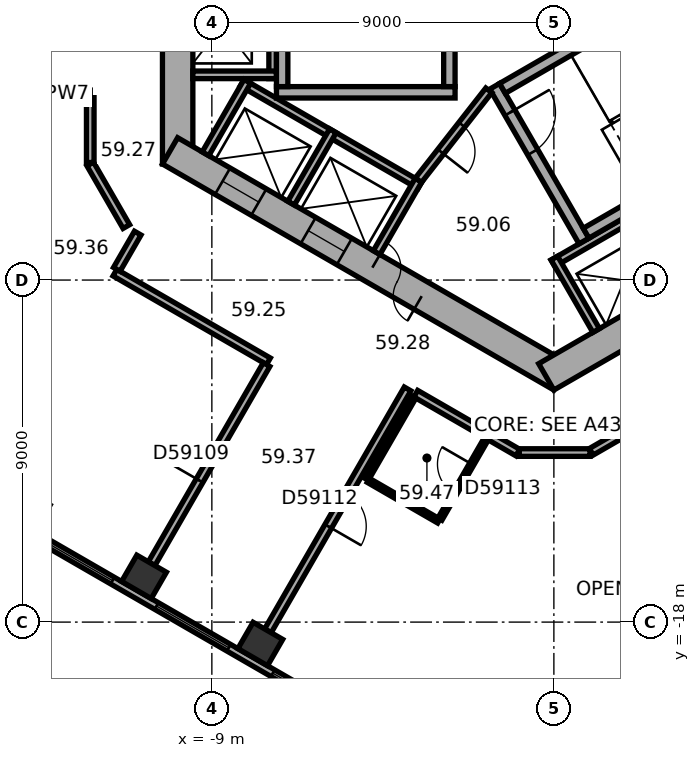
"""IFC4 building model, lengths in metres.
Left out: names, types, materials, properties, quantities, classifications, styles, units other than length and angle.
Written with IfcOpenShell. Run it as: python <this file> out.ifc"""

import sys

from ifc_helpers import new_model, si_unit, direction, frame, frame_2d, origin, origin_2d, place, context, subcontext, project, spatial, rectangle, extrude, element, fill, save


model = new_model("IFC4")
c1 = context("Model", 3, precision=1e-05, world=origin(), true_north=direction((0.0, 1.0)))
c2 = subcontext(c1, "Body", "Model", "MODEL_VIEW")
j1 = project(units=[si_unit("LENGTHUNIT", "METRE"), si_unit("PLANEANGLEUNIT", "RADIAN")], contexts=[c1])
p1 = place(None, origin())
s1 = spatial("IfcSite", under=j1, at=p1, CompositionType="ELEMENT")
p2 = place(p1, origin())
s2 = spatial("IfcBuilding", under=s1, at=p2, CompositionType="ELEMENT")
p3 = place(p2, frame((0.0, 0.0, 240.2)))
s3 = spatial("IfcBuildingStorey", under=s2, at=p3, CompositionType="ELEMENT", Elevation=240.2)
for number, where, z_axis, x_axis in (
    (1, (-10.785, -16.809, 0.0), (0.0, 0.0, 1.0), (0.866, -0.5, 0.0)),
    (2, (-7.725, -18.576, 0.0), (0.0, 0.0, 1.0), (0.866, -0.5, 0.0)),
):
    element("IfcColumn", number, at=place(p3, frame(where, z_axis=z_axis, x_axis=x_axis)), inside=s3, PredefinedType="COLUMN", context=c2, shape_type="SweptSolid", body=[
        extrude(rectangle(XDim=0.9, YDim=0.8, at=origin_2d()), origin(), (0.0, 0.0, 1.0), 3.7),
    ])
p4 = place(p3, frame((-9.9, 5.947, 0.0), z_axis=(0.0, 0.0, 1.0), x_axis=(0.0, -1.0, 0.0)))
e3 = element("IfcWall", 3, at=p4, inside=s3, PredefinedType="SHEAR", context=c2, shape_type="SweptSolid", body=[
    extrude(rectangle(XDim=11.894, YDim=0.8, at=frame_2d((5.947, 0.0))), origin(), (0.0, 0.0, 1.0), 3.7),
])
p5 = place(p4, frame((5.097, 0.0, 0.0)))
e4 = element("IfcOpeningElement", 4, at=p5, cuts=e3, PredefinedType="OPENING", context=c2, shape_type="SweptSolid", body=[
    extrude(rectangle(XDim=1.1, YDim=2.1, at=frame_2d((0.55, 1.05))), frame((0.0, 0.41, 0.0), z_axis=(0.0, -1.0, 0.0), x_axis=(1.0, 0.0, 0.0)), (0.0, 0.0, 1.0), 0.82),
])
p6 = place(p4, frame((7.697, 0.0, 0.0)))
e5 = element("IfcOpeningElement", 5, at=p6, cuts=e3, PredefinedType="OPENING", context=c2, shape_type="SweptSolid", body=[
    extrude(rectangle(XDim=1.1, YDim=2.1, at=frame_2d((0.55, 1.05))), frame((0.0, 0.41, 0.0), z_axis=(0.0, -1.0, 0.0), x_axis=(1.0, 0.0, 0.0)), (0.0, 0.0, 1.0), 0.82),
])
p7 = place(p3, frame((-10.1, -5.6, 0.0), z_axis=(0.0, 0.0, 1.0), x_axis=(0.866023897231, -0.500002609418, 0.0)))
e6 = element("IfcWall", 6, at=p7, inside=s3, PredefinedType="SHEAR", context=c2, shape_type="SweptSolid", body=[
    extrude(rectangle(XDim=11.894, YDim=0.8, at=frame_2d((5.947, 0.0))), origin(), (0.0, 0.0, 1.0), 3.7),
])
p8 = place(p7, frame((6.147, 0.0, 0.0)))
e7 = element("IfcOpeningElement", 7, at=p8, cuts=e6, PredefinedType="OPENING", context=c2, shape_type="SweptSolid", body=[
    extrude(rectangle(XDim=1.5, YDim=2.1, at=frame_2d((0.75, 1.05))), frame((0.0, 0.41, 0.0), z_axis=(0.0, -1.0, 0.0), x_axis=(1.0, 0.0, 0.0)), (0.0, 0.0, 1.0), 0.82),
])
p9 = place(p7, frame((1.597, 0.0, 0.0)))
e8 = element("IfcOpeningElement", 8, at=p9, cuts=e6, PredefinedType="OPENING", context=c2, shape_type="SweptSolid", body=[
    extrude(rectangle(XDim=1.1, YDim=2.1, at=frame_2d((0.55, 1.05))), frame((0.0, 0.41, 0.0), z_axis=(0.0, -1.0, 0.0), x_axis=(1.0, 0.0, 0.0)), (0.0, 0.0, 1.0), 0.82),
])
p10 = place(p7, frame((4.197, 0.0, 0.0)))
e9 = element("IfcOpeningElement", 9, at=p10, cuts=e6, PredefinedType="OPENING", context=c2, shape_type="SweptSolid", body=[
    extrude(rectangle(XDim=1.1, YDim=2.1, at=frame_2d((0.55, 1.05))), frame((0.0, 0.41, 0.0), z_axis=(0.0, -1.0, 0.0), x_axis=(1.0, 0.0, 0.0)), (0.0, 0.0, 1.0), 0.82),
])
p11 = place(p3, frame((-0.2, -11.547, 0.0), z_axis=(0.0, 0.0, 1.0), x_axis=(0.866023897231, 0.500002609418, 0.0)))
e10 = element("IfcWall", 10, at=p11, inside=s3, PredefinedType="SHEAR", context=c2, shape_type="SweptSolid", body=[
    extrude(rectangle(XDim=11.894, YDim=0.8, at=frame_2d((5.947, 0.0))), origin(), (0.0, 0.0, 1.0), 3.7),
])
p12 = place(p11, frame((2.497, 0.0, 0.0)))
e11 = element("IfcOpeningElement", 11, at=p12, cuts=e10, PredefinedType="OPENING", context=c2, shape_type="SweptSolid", body=[
    extrude(rectangle(XDim=1.1, YDim=2.1, at=frame_2d((0.55, 1.05))), frame((0.0, 0.41, 0.0), z_axis=(0.0, -1.0, 0.0), x_axis=(1.0, 0.0, 0.0)), (0.0, 0.0, 1.0), 0.82),
])
p13 = place(p11, frame((5.097, 0.0, 0.0)))
e12 = element("IfcOpeningElement", 12, at=p13, cuts=e10, PredefinedType="OPENING", context=c2, shape_type="SweptSolid", body=[
    extrude(rectangle(XDim=1.1, YDim=2.1, at=frame_2d((0.55, 1.05))), frame((0.0, 0.41, 0.0), z_axis=(0.0, -1.0, 0.0), x_axis=(1.0, 0.0, 0.0)), (0.0, 0.0, 1.0), 0.82),
])
p14 = place(p11, frame((7.697, 0.0, 0.0)))
e13 = element("IfcOpeningElement", 13, at=p14, cuts=e10, PredefinedType="OPENING", context=c2, shape_type="SweptSolid", body=[
    extrude(rectangle(XDim=1.1, YDim=2.1, at=frame_2d((0.55, 1.05))), frame((0.0, 0.41, 0.0), z_axis=(0.0, -1.0, 0.0), x_axis=(1.0, 0.0, 0.0)), (0.0, 0.0, 1.0), 0.82),
])
p15 = place(p3, frame((-17.664, -13.415, 0.0), z_axis=(0.0, 0.0, 1.0), x_axis=(0.866026555358, -0.49999800541, 0.0)))
e14 = element("IfcWall", 14, at=p15, inside=s3, PredefinedType="STANDARD", context=c2, shape_type="SweptSolid", body=[
    extrude(rectangle(XDim=18.841, YDim=0.2, at=frame_2d((9.421, 0.0))), origin(), (0.0, 0.0, 1.0), 3.7),
])
p16 = place(p15, frame((1.254, 0.0, 0.9)))
e15 = element("IfcOpeningElement", 15, at=p16, cuts=e14, PredefinedType="OPENING", context=c2, shape_type="SweptSolid", body=[
    extrude(rectangle(XDim=2.2, YDim=2.0, at=frame_2d((1.1, 1.0))), frame((0.0, 0.11, 0.0), z_axis=(0.0, -1.0, 0.0), x_axis=(1.0, 0.0, 0.0)), (0.0, 0.0, 1.0), 0.22),
])
p17 = place(p15, frame((4.788, 0.0, 0.9)))
e16 = element("IfcOpeningElement", 16, at=p17, cuts=e14, PredefinedType="OPENING", context=c2, shape_type="SweptSolid", body=[
    extrude(rectangle(XDim=2.2, YDim=2.0, at=frame_2d((1.1, 1.0))), frame((0.0, 0.11, 0.0), z_axis=(0.0, -1.0, 0.0), x_axis=(1.0, 0.0, 0.0)), (0.0, 0.0, 1.0), 0.22),
])
p18 = place(p15, frame((8.322, 0.0, 0.9)))
e17 = element("IfcOpeningElement", 17, at=p18, cuts=e14, PredefinedType="OPENING", context=c2, shape_type="SweptSolid", body=[
    extrude(rectangle(XDim=2.2, YDim=2.0, at=frame_2d((1.1, 1.0))), frame((0.0, 0.11, 0.0), z_axis=(0.0, -1.0, 0.0), x_axis=(1.0, 0.0, 0.0)), (0.0, 0.0, 1.0), 0.22),
])
p19 = place(p15, frame((11.855, 0.0, 0.9)))
e18 = element("IfcOpeningElement", 18, at=p19, cuts=e14, PredefinedType="OPENING", context=c2, shape_type="SweptSolid", body=[
    extrude(rectangle(XDim=2.2, YDim=2.0, at=frame_2d((1.1, 1.0))), frame((0.0, 0.11, 0.0), z_axis=(0.0, -1.0, 0.0), x_axis=(1.0, 0.0, 0.0)), (0.0, 0.0, 1.0), 0.22),
])
p20 = place(p15, frame((15.389, 0.0, 0.9)))
e19 = element("IfcOpeningElement", 19, at=p20, cuts=e14, PredefinedType="OPENING", context=c2, shape_type="SweptSolid", body=[
    extrude(rectangle(XDim=2.2, YDim=2.0, at=frame_2d((1.1, 1.0))), frame((0.0, 0.11, 0.0), z_axis=(0.0, -1.0, 0.0), x_axis=(1.0, 0.0, 0.0)), (0.0, 0.0, 1.0), 0.22),
])
p21 = place(p3, frame((-7.4, 4.3, 0.0), z_axis=(0.0, 0.0, 1.0), x_axis=(0.0, -1.0, 0.0)))
e20 = element("IfcWall", 20, at=p21, inside=s3, PredefinedType="PARTITIONING", context=c2, shape_type="SweptSolid", body=[
    extrude(rectangle(XDim=8.0, YDim=0.2, at=frame_2d((4.0, 0.0))), origin(), (0.0, 0.0, 1.0), 3.42),
])
p22 = place(p3, frame((-7.3, -3.6, 0.0), z_axis=(0.0, 0.0, 1.0), x_axis=(-1.0, 0.0, 0.0)))
e21 = element("IfcWall", 21, at=p22, inside=s3, PredefinedType="PARTITIONING", context=c2, shape_type="SweptSolid", body=[
    extrude(rectangle(XDim=2.2, YDim=0.2, at=frame_2d((1.1, 0.0))), origin(), (0.0, 0.0, 1.0), 3.42),
])
p23 = place(p3, frame((-8.203, -3.809, 0.0), z_axis=(0.0, 0.0, 1.0), x_axis=(0.866028230842, -0.499995103361, 0.0)))
e22 = element("IfcWall", 22, at=p23, inside=s3, PredefinedType="PARTITIONING", context=c2, shape_type="SweptSolid", body=[
    extrude(rectangle(XDim=5.4, YDim=0.2, at=frame_2d((2.7, 0.0))), origin(), (0.0, 0.0, 1.0), 3.42),
])
for number, where, z_axis, x_axis in (
    (23, (-8.067, -3.772, 0.0), (0.0, 0.0, 1.0), (-0.5, -0.866, 0.0)),
    (24, (-5.815, -5.072, 0.0), (0.0, 0.0, 1.0), (-0.5, -0.866, 0.0)),
):
    element("IfcWall", number, at=place(p3, frame(where, z_axis=z_axis, x_axis=x_axis)), inside=s3, PredefinedType="PARTITIONING", context=c2, shape_type="SweptSolid", body=[
        extrude(rectangle(XDim=2.2, YDim=0.2, at=frame_2d((1.1, 0.0))), origin(), (0.0, 0.0, 1.0), 3.42),
    ])
p24 = place(p3, frame((-3.563, -6.372, 0.0), z_axis=(0.0, 0.0, 1.0), x_axis=(-0.499994660107, -0.866028486751, 0.0)))
e25 = element("IfcWall", 25, at=p24, inside=s3, PredefinedType="PARTITIONING", context=c2, shape_type="SweptSolid", body=[
    extrude(rectangle(XDim=2.2, YDim=0.2, at=frame_2d((1.1, 0.0))), origin(), (0.0, 0.0, 1.0), 3.42),
])
p25 = place(p3, frame((-0.024, -8.559, 0.0), z_axis=(0.0, 0.0, 1.0), x_axis=(0.866026010844, 0.49999894854, 0.0)))
e26 = element("IfcWall", 26, at=p25, inside=s3, PredefinedType="PARTITIONING", context=c2, shape_type="SweptSolid", body=[
    extrude(rectangle(XDim=8.0, YDim=0.2, at=frame_2d((4.0, 0.0))), origin(), (0.0, 0.0, 1.0), 3.42),
])
p26 = place(p3, frame((0.013, -8.422, 0.0), z_axis=(0.0, 0.0, 1.0), x_axis=(0.500077893725, -0.86598042715, 0.0)))
e27 = element("IfcWall", 27, at=p26, inside=s3, PredefinedType="PARTITIONING", context=c2, shape_type="SweptSolid", body=[
    extrude(rectangle(XDim=2.2, YDim=0.2, at=frame_2d((1.1, 0.0))), origin(), (0.0, 0.0, 1.0), 3.42),
])
p27 = place(p3, frame((-2.6, -4.06, 0.0), z_axis=(0.0, 0.0, 1.0), x_axis=(-1.0, 0.0, 0.0)))
e28 = element("IfcWall", 28, at=p27, inside=s3, PredefinedType="SHEAR", context=c2, shape_type="SweptSolid", body=[
    extrude(rectangle(XDim=4.7, YDim=0.3, at=frame_2d((2.35, 0.0))), origin(), (0.0, 0.0, 1.0), 3.42),
])
for number, where, z_axis, x_axis in (
    (29, (-2.75, 3.15, 0.0), (0.0, 0.0, 1.0), (0.0, -1.0, 0.0)),
    (30, (-7.15, 3.15, 0.0), (0.0, 0.0, 1.0), (0.0, -1.0, 0.0)),
):
    element("IfcWall", number, at=place(p3, frame(where, z_axis=z_axis, x_axis=x_axis)), inside=s3, PredefinedType="SHEAR", context=c2, shape_type="SweptSolid", body=[
        extrude(rectangle(XDim=7.06, YDim=0.3, at=frame_2d((3.53, 0.0))), origin(), (0.0, 0.0, 1.0), 3.42),
    ])
p28 = place(p3, frame((-1.558, -3.902, 0.0), z_axis=(0.0, 0.0, 1.0), x_axis=(0.499977259774, -0.866038532462, 0.0)))
e31 = element("IfcWall", 31, at=p28, inside=s3, PredefinedType="SHEAR", context=c2, shape_type="SweptSolid", body=[
    extrude(rectangle(XDim=4.7, YDim=0.3, at=frame_2d((2.35, 0.0))), origin(), (0.0, 0.0, 1.0), 3.42),
])
p29 = place(p28, frame((0.8, 0.0, 0.0)))
e32 = element("IfcOpeningElement", 32, at=p29, cuts=e31, PredefinedType="OPENING", context=c2, shape_type="SweptSolid", body=[
    extrude(rectangle(XDim=1.2, YDim=2.1, at=frame_2d((0.6, 1.05))), frame((0.0, 0.16, 0.0), z_axis=(0.0, -1.0, 0.0), x_axis=(1.0, 0.0, 0.0)), (0.0, 0.0, 1.0), 0.32),
])
for number, where, z_axis, x_axis in (
    (33, (-1.353, -3.957, 0.0), (0.0, 0.0, 1.0), (0.866, 0.5, 0.0)),
    (34, (0.847, -7.767, 0.0), (0.0, 0.0, 1.0), (0.866, 0.5, 0.0)),
):
    element("IfcWall", number, at=place(p3, frame(where, z_axis=z_axis, x_axis=x_axis)), inside=s3, PredefinedType="SHEAR", context=c2, shape_type="SweptSolid", body=[
        extrude(rectangle(XDim=7.06, YDim=0.3, at=frame_2d((3.53, 0.0))), origin(), (0.0, 0.0, 1.0), 3.42),
    ])
p30 = place(p3, frame((-1.712, -4.008, 0.0), z_axis=(0.0, 0.0, 1.0), x_axis=(-0.616549420702, -0.787316208287, 0.0)))
e35 = element("IfcWall", 35, at=p30, inside=s3, PredefinedType="PARTITIONING", context=c2, shape_type="SweptSolid", body=[
    extrude(rectangle(XDim=3.002, YDim=0.2, at=frame_2d((1.501, 0.0))), origin(), (0.0, 0.0, 1.0), 3.42),
])
p31 = place(p30, frame((1.15, 0.0, 0.0)))
e36 = element("IfcOpeningElement", 36, at=p31, cuts=e35, PredefinedType="OPENING", context=c2, shape_type="SweptSolid", body=[
    extrude(rectangle(XDim=0.9, YDim=2.1, at=frame_2d((0.45, 1.05))), frame((0.0, 0.11, 0.0), z_axis=(0.0, -1.0, 0.0), x_axis=(1.0, 0.0, 0.0)), (0.0, 0.0, 1.0), 0.22),
])
p32 = place(p3, frame((-13.401, -4.101, 0.0), z_axis=(0.0, 0.0, 1.0), x_axis=(1.0, 0.0, 0.0)))
e37 = element("IfcWall", 37, at=p32, inside=s3, PredefinedType="PARTITIONING", context=c2, shape_type="SweptSolid", body=[
    extrude(rectangle(XDim=1.201, YDim=0.2, at=frame_2d((0.601, 0.0))), origin(), (0.0, 0.0, 1.0), 3.42),
])
p33 = place(p3, frame((-12.2, -5.947, 0.0), z_axis=(0.0, 0.0, 1.0), x_axis=(0.500022797313, -0.86601224135, 0.0)))
e38 = element("IfcWall", 38, at=p33, inside=s3, PredefinedType="PARTITIONING", context=c2, shape_type="SweptSolid", body=[
    extrude(rectangle(XDim=1.9, YDim=0.2, at=frame_2d((0.95, 0.0))), origin(), (0.0, 0.0, 1.0), 3.42),
])
p34 = place(p3, frame((-12.2, -4.201, 0.0), z_axis=(0.0, 0.0, 1.0), x_axis=(0.0, -1.0, 0.0)))
e39 = element("IfcWall", 39, at=p34, inside=s3, PredefinedType="PARTITIONING", context=c2, shape_type="SweptSolid", body=[
    extrude(rectangle(XDim=1.706, YDim=0.2, at=frame_2d((0.853, 0.0))), origin(), (0.0, 0.0, 1.0), 3.42),
])
p35 = place(p3, frame((-11.551, -8.805, 0.0), z_axis=(0.0, 0.0, 1.0), x_axis=(0.866038310922, -0.499977643516, 0.0)))
e40 = element("IfcWall", 40, at=p35, inside=s3, PredefinedType="PARTITIONING", context=c2, shape_type="SweptSolid", body=[
    extrude(rectangle(XDim=4.665, YDim=0.2, at=frame_2d((2.333, 0.0))), origin(), (0.0, 0.0, 1.0), 3.42),
])
p36 = place(p3, frame((-10.951, -7.765, 0.0), z_axis=(0.0, 0.0, 1.0), x_axis=(-0.499978356969, -0.866037899034, 0.0)))
e41 = element("IfcWall", 41, at=p36, inside=s3, PredefinedType="PARTITIONING", context=c2, shape_type="SweptSolid", body=[
    extrude(rectangle(XDim=1.101, YDim=0.2, at=frame_2d((0.551, 0.0))), origin(), (0.0, 0.0, 1.0), 3.42),
])
p37 = place(p3, frame((-10.585, -16.463, 0.0), z_axis=(0.0, 0.0, 1.0), x_axis=(0.499993802756, 0.866028981735, 0.0)))
e42 = element("IfcWall", 42, at=p37, inside=s3, PredefinedType="PARTITIONING", context=c2, shape_type="SweptSolid", body=[
    extrude(rectangle(XDim=6.049, YDim=0.2, at=frame_2d((3.024, 0.0))), origin(), (0.0, 0.0, 1.0), 2.87),
])
p38 = place(p37, frame((2.524, 0.0, 0.0)))
e43 = element("IfcOpeningElement", 43, at=p38, cuts=e42, PredefinedType="OPENING", context=c2, shape_type="SweptSolid", body=[
    extrude(rectangle(XDim=1.0, YDim=2.1, at=frame_2d((0.5, 1.05))), frame((0.0, 0.11, 0.0), z_axis=(0.0, -1.0, 0.0), x_axis=(1.0, 0.0, 0.0)), (0.0, 0.0, 1.0), 0.22),
])
p39 = place(p3, frame((-7.525, -18.23, 0.0), z_axis=(0.0, 0.0, 1.0), x_axis=(0.499983153418, 0.866035129944, 0.0)))
e44 = element("IfcWall", 44, at=p39, inside=s3, PredefinedType="PARTITIONING", context=c2, shape_type="SweptSolid", body=[
    extrude(rectangle(XDim=7.35, YDim=0.2, at=frame_2d((3.675, 0.0))), origin(), (0.0, 0.0, 1.0), 3.42),
])
p40 = place(p39, frame((3.175, 0.0, 0.0)))
e45 = element("IfcOpeningElement", 45, at=p40, cuts=e44, PredefinedType="OPENING", context=c2, shape_type="SweptSolid", body=[
    extrude(rectangle(XDim=1.0, YDim=2.1, at=frame_2d((0.5, 1.05))), frame((0.0, 0.11, 0.0), z_axis=(0.0, -1.0, 0.0), x_axis=(1.0, 0.0, 0.0)), (0.0, 0.0, 1.0), 0.22),
])
p41 = place(p3, frame((-4.934, -14.241, 0.0), z_axis=(0.0, 0.0, 1.0), x_axis=(0.500004234368, 0.866022959057, 0.0)))
e46 = element("IfcWall", 46, at=p41, inside=s3, PredefinedType="PARTITIONING", context=c2, shape_type="SweptSolid", body=[
    extrude(rectangle(XDim=2.5, YDim=0.12, at=frame_2d((1.25, 0.0))), origin(), (0.0, 0.0, 1.0), 3.42),
])
p42 = place(p3, frame((-3.634, -11.99, 0.0), z_axis=(0.0, 0.0, 1.0), x_axis=(0.866033392248, -0.499986163319, 0.0)))
e47 = element("IfcWall", 47, at=p42, inside=s3, PredefinedType="PARTITIONING", context=c2, shape_type="SweptSolid", body=[
    extrude(rectangle(XDim=3.099, YDim=0.2, at=frame_2d((1.549, 0.0))), origin(), (0.0, 0.0, 1.0), 3.42),
])
p43 = place(p3, frame((-3.028, -15.341, 0.0), z_axis=(0.0, 0.0, 1.0), x_axis=(-0.86600889856, 0.500028586798, 0.0)))
e48 = element("IfcWall", 48, at=p43, inside=s3, PredefinedType="PARTITIONING", context=c2, shape_type="SweptSolid", body=[
    extrude(rectangle(XDim=2.14, YDim=0.12, at=frame_2d((1.07, 0.0))), origin(), (0.0, 0.0, 1.0), 3.42),
])
p44 = place(p3, frame((-1.778, -13.176, 0.0), z_axis=(0.0, 0.0, 1.0), x_axis=(-0.500002508028, -0.866023955769, 0.0)))
e49 = element("IfcWall", 49, at=p44, inside=s3, PredefinedType="PARTITIONING", context=c2, shape_type="SweptSolid", body=[
    extrude(rectangle(XDim=2.44, YDim=0.12, at=frame_2d((1.22, 0.0))), origin(), (0.0, 0.0, 1.0), 3.42),
])
p45 = place(p44, frame((0.77, 0.0, 0.0)))
e50 = element("IfcOpeningElement", 50, at=p45, cuts=e49, PredefinedType="OPENING", context=c2, shape_type="SweptSolid", body=[
    extrude(rectangle(XDim=0.9, YDim=2.1, at=frame_2d((0.45, 1.05))), frame((0.0, 0.07, 0.0), z_axis=(0.0, -1.0, 0.0), x_axis=(1.0, 0.0, 0.0)), (0.0, 0.0, 1.0), 0.14),
])
p46 = place(p3, frame((-0.91, -13.539, 0.0), z_axis=(0.0, 0.0, 1.0), x_axis=(1.0, 0.0, 0.0)))
e51 = element("IfcWall", 51, at=p46, inside=s3, PredefinedType="PARTITIONING", context=c2, shape_type="SweptSolid", body=[
    extrude(rectangle(XDim=1.86, YDim=0.2, at=frame_2d((0.93, 0.0))), origin(), (0.0, 0.0, 1.0), 3.42),
])
p47 = place(p3, frame((0.985, -13.519, 0.0), z_axis=(0.0, 0.0, 1.0), x_axis=(0.866054082991, 0.499950322867, 0.0)))
e52 = element("IfcWall", 52, at=p47, inside=s3, PredefinedType="PARTITIONING", context=c2, shape_type="SweptSolid", body=[
    extrude(rectangle(XDim=1.206, YDim=0.2, at=frame_2d((0.603, 0.0))), origin(), (0.0, 0.0, 1.0), 3.42),
])
p48 = place(p17, origin())
e53 = element("IfcWindow", 53, at=p48, inside=s3, PartitioningType="SINGLE_PANEL", PredefinedType="WINDOW", context=c2, shape_type="SweptSolid", body=[
    extrude(rectangle(XDim=2.2, YDim=2.0, at=frame_2d((1.1, 1.0))), frame((0.0, 0.03, 0.0), z_axis=(0.0, -1.0, 0.0), x_axis=(1.0, 0.0, 0.0)), (0.0, 0.0, 1.0), 0.06),
])
fill(e16, e53)
p49 = place(p18, origin())
e54 = element("IfcWindow", 54, at=p49, inside=s3, PartitioningType="SINGLE_PANEL", PredefinedType="WINDOW", context=c2, shape_type="SweptSolid", body=[
    extrude(rectangle(XDim=2.2, YDim=2.0, at=frame_2d((1.1, 1.0))), frame((0.0, 0.03, 0.0), z_axis=(0.0, -1.0, 0.0), x_axis=(1.0, 0.0, 0.0)), (0.0, 0.0, 1.0), 0.06),
])
fill(e17, e54)
p50 = place(p19, origin())
e55 = element("IfcWindow", 55, at=p50, inside=s3, PartitioningType="SINGLE_PANEL", PredefinedType="WINDOW", context=c2, shape_type="SweptSolid", body=[
    extrude(rectangle(XDim=2.2, YDim=2.0, at=frame_2d((1.1, 1.0))), frame((0.0, 0.03, 0.0), z_axis=(0.0, -1.0, 0.0), x_axis=(1.0, 0.0, 0.0)), (0.0, 0.0, 1.0), 0.06),
])
fill(e18, e55)
p51 = place(p8, origin())
e56 = element("IfcDoor", 56, at=p51, inside=s3, OperationType="DOUBLE_DOOR_SINGLE_SWING", PredefinedType="DOOR", context=c2, shape_type="SweptSolid", body=[
    extrude(rectangle(XDim=1.5, YDim=2.1, at=frame_2d((0.75, 1.05))), frame((0.0, 0.025, 0.0), z_axis=(0.0, -1.0, 0.0), x_axis=(1.0, 0.0, 0.0)), (0.0, 0.0, 1.0), 0.05),
])
fill(e7, e56)
p52 = place(p29, origin())
e57 = element("IfcDoor", 57, at=p52, inside=s3, OperationType="SINGLE_SWING_RIGHT", PredefinedType="DOOR", context=c2, shape_type="SweptSolid", body=[
    extrude(rectangle(XDim=1.2, YDim=2.1, at=frame_2d((0.6, 1.05))), frame((0.0, 0.025, 0.0), z_axis=(0.0, -1.0, 0.0), x_axis=(1.0, 0.0, 0.0)), (0.0, 0.0, 1.0), 0.05),
])
fill(e32, e57)
p53 = place(p31, origin())
e58 = element("IfcDoor", 58, at=p53, inside=s3, OperationType="SINGLE_SWING_LEFT", PredefinedType="DOOR", context=c2, shape_type="SweptSolid", body=[
    extrude(rectangle(XDim=0.9, YDim=2.1, at=frame_2d((0.45, 1.05))), frame((0.0, 0.025, 0.0), z_axis=(0.0, -1.0, 0.0), x_axis=(1.0, 0.0, 0.0)), (0.0, 0.0, 1.0), 0.05),
])
fill(e36, e58)
p54 = place(p9, origin())
e59 = element("IfcDoor", 59, at=p54, inside=s3, OperationType="DOUBLE_DOOR_SLIDING", PredefinedType="DOOR", context=c2, shape_type="SweptSolid", body=[
    extrude(rectangle(XDim=1.1, YDim=2.1, at=frame_2d((0.55, 1.05))), frame((0.0, 0.025, 0.0), z_axis=(0.0, -1.0, 0.0), x_axis=(1.0, 0.0, 0.0)), (0.0, 0.0, 1.0), 0.05),
])
fill(e8, e59)
p55 = place(p10, origin())
e60 = element("IfcDoor", 60, at=p55, inside=s3, OperationType="DOUBLE_DOOR_SLIDING", PredefinedType="DOOR", context=c2, shape_type="SweptSolid", body=[
    extrude(rectangle(XDim=1.1, YDim=2.1, at=frame_2d((0.55, 1.05))), frame((0.0, 0.025, 0.0), z_axis=(0.0, -1.0, 0.0), x_axis=(1.0, 0.0, 0.0)), (0.0, 0.0, 1.0), 0.05),
])
fill(e9, e60)
p56 = place(p38, origin())
e61 = element("IfcDoor", 61, at=p56, inside=s3, OperationType="SINGLE_SWING_LEFT", PredefinedType="DOOR", context=c2, shape_type="SweptSolid", body=[
    extrude(rectangle(XDim=1.0, YDim=2.1, at=frame_2d((0.5, 1.05))), frame((0.0, 0.025, 0.0), z_axis=(0.0, -1.0, 0.0), x_axis=(1.0, 0.0, 0.0)), (0.0, 0.0, 1.0), 0.05),
])
fill(e43, e61)
p57 = place(p40, origin())
e62 = element("IfcDoor", 62, at=p57, inside=s3, OperationType="SINGLE_SWING_LEFT", PredefinedType="DOOR", context=c2, shape_type="SweptSolid", body=[
    extrude(rectangle(XDim=1.0, YDim=2.1, at=frame_2d((0.5, 1.05))), frame((0.0, 0.025, 0.0), z_axis=(0.0, -1.0, 0.0), x_axis=(1.0, 0.0, 0.0)), (0.0, 0.0, 1.0), 0.05),
])
fill(e45, e62)
p58 = place(p45, origin())
e63 = element("IfcDoor", 63, at=p58, inside=s3, OperationType="SINGLE_SWING_LEFT", PredefinedType="DOOR", context=c2, shape_type="SweptSolid", body=[
    extrude(rectangle(XDim=0.9, YDim=2.1, at=frame_2d((0.45, 1.05))), frame((0.0, 0.025, 0.0), z_axis=(0.0, -1.0, 0.0), x_axis=(1.0, 0.0, 0.0)), (0.0, 0.0, 1.0), 0.05),
])
fill(e50, e63)
save(model, sys.argv[1])
